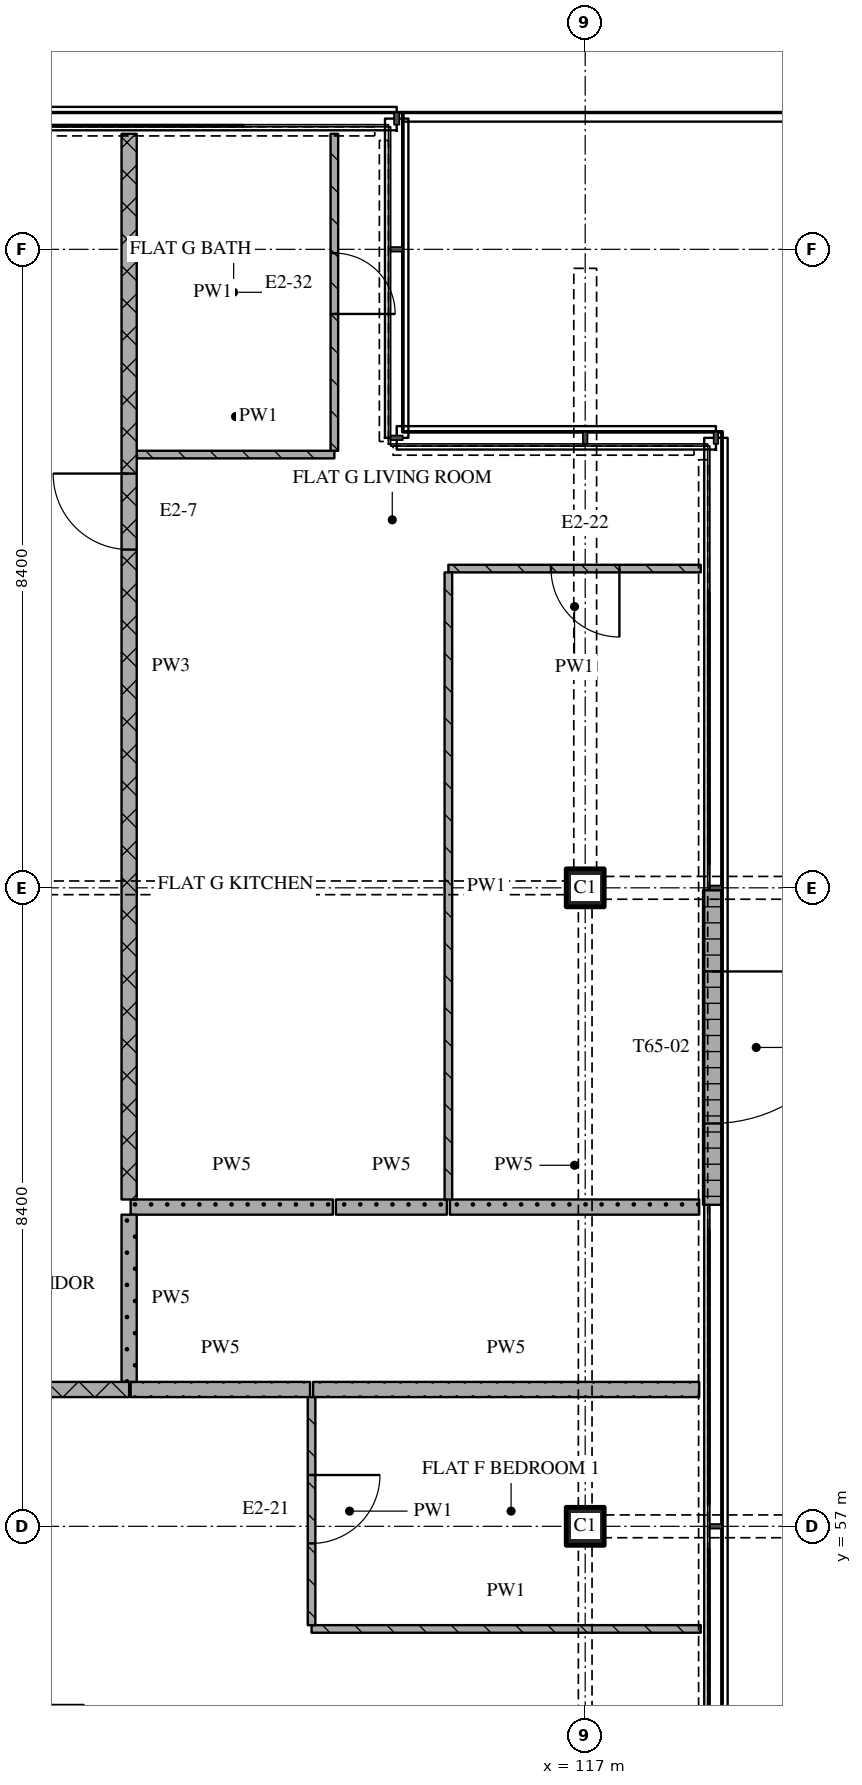
"""IFC4 building model, lengths in metres.
Left out: names, types, materials, properties, quantities, classifications, styles, units other than length and angle.
Written with IfcOpenShell. Run it as: python <this file> out.ifc"""

import sys

from ifc_helpers import new_model, si_unit, direction, frame, frame_2d, origin, origin_2d, place, context, subcontext, project, spatial, rectangle, extrude, element, fill, save


model = new_model("IFC4")
c1 = context("Model", 3, precision=1e-05, world=origin(), true_north=direction((0.0, 1.0)))
c2 = subcontext(c1, "Body", "Model", "MODEL_VIEW")
j1 = project(units=[si_unit("LENGTHUNIT", "METRE"), si_unit("PLANEANGLEUNIT", "RADIAN")], contexts=[c1])
p1 = place(None, origin())
s1 = spatial("IfcSite", under=j1, at=p1, CompositionType="ELEMENT")
p2 = place(p1, origin())
s2 = spatial("IfcBuilding", under=s1, at=p2, CompositionType="ELEMENT")
p3 = place(p2, frame((0.0, 0.0, 270.75)))
s3 = spatial("IfcBuildingStorey", under=s2, at=p3, CompositionType="ELEMENT", Elevation=270.75)
for number, where, z_axis, x_axis in (
    (1, (117.0, 57.0, 0.0), (0.0, 0.0, 1.0), (1.0, 0.0, 0.0)),
    (2, (117.0, 65.4, 0.0), (0.0, 0.0, 1.0), (1.0, 0.0, 0.0)),
):
    element("IfcColumn", number, at=place(p3, frame(where, z_axis=z_axis, x_axis=x_axis)), inside=s3, PredefinedType="COLUMN", context=c2, shape_type="SweptSolid", body=[
        extrude(rectangle(XDim=0.5, YDim=0.5, at=origin_2d()), origin(), (0.0, 0.0, 1.0), 3.6),
    ])
p4 = place(p3, frame((118.675, 65.37, 0.0), z_axis=(0.0, 0.0, 1.0), x_axis=(0.0, -1.0, 0.0)))
e3 = element("IfcWall", 3, at=p4, inside=s3, PredefinedType="SOLIDWALL", context=c2, shape_type="SweptSolid", body=[
    extrude(rectangle(XDim=4.14, YDim=0.25, at=frame_2d((2.07, 0.0))), origin(), (0.0, 0.0, 1.0), 3.32),
])
p5 = place(p4, frame((1.07, 0.0, 0.0)))
e4 = element("IfcOpeningElement", 4, at=p5, cuts=e3, PredefinedType="OPENING", context=c2, shape_type="SweptSolid", body=[
    extrude(rectangle(XDim=2.0, YDim=2.4, at=frame_2d((1.0, 1.2))), frame((0.0, 0.135, 0.0), z_axis=(0.0, -1.0, 0.0), x_axis=(1.0, 0.0, 0.0)), (0.0, 0.0, 1.0), 0.27),
])
p6 = place(p3, frame((101.5, 54.6, 0.0), z_axis=(0.0, 0.0, 1.0), x_axis=(1.0, 0.0, 0.0)))
e5 = element("IfcWall", 5, at=p6, inside=s3, PredefinedType="PARTITIONING", context=c2, shape_type="SweptSolid", body=[
    extrude(rectangle(XDim=8.9, YDim=0.1, at=frame_2d((4.45, 0.0))), origin(), (0.0, 0.0, 1.0), 3.32),
])
p7 = place(p3, frame((113.4, 55.65, 0.0), z_axis=(0.0, 0.0, 1.0), x_axis=(1.0, 0.0, 0.0)))
e6 = element("IfcWall", 6, at=p7, inside=s3, PredefinedType="PARTITIONING", context=c2, shape_type="SweptSolid", body=[
    extrude(rectangle(XDim=5.12, YDim=0.1, at=frame_2d((2.56, 0.0))), origin(), (0.0, 0.0, 1.0), 3.32),
])
p8 = place(p3, frame((101.4, 58.8, 0.0), z_axis=(0.0, 0.0, 1.0), x_axis=(1.0, 0.0, 0.0)))
e7 = element("IfcWall", 7, at=p8, inside=s3, PredefinedType="PARTITIONING", context=c2, shape_type="SweptSolid", body=[
    extrude(rectangle(XDim=9.6, YDim=0.2, at=frame_2d((4.8, 0.0))), origin(), (0.0, 0.0, 1.0), 3.32),
])
p9 = place(p3, frame((111.02, 58.8, 0.0), z_axis=(0.0, 0.0, 1.0), x_axis=(1.0, 0.0, 0.0)))
e8 = element("IfcWall", 8, at=p9, inside=s3, PredefinedType="PARTITIONING", context=c2, shape_type="SweptSolid", body=[
    extrude(rectangle(XDim=2.36, YDim=0.2, at=frame_2d((1.18, 0.0))), origin(), (0.0, 0.0, 1.0), 3.32),
])
p10 = place(p3, frame((113.42, 58.8, 0.0), z_axis=(0.0, 0.0, 1.0), x_axis=(1.0, 0.0, 0.0)))
e9 = element("IfcWall", 9, at=p10, inside=s3, PredefinedType="PARTITIONING", context=c2, shape_type="SweptSolid", body=[
    extrude(rectangle(XDim=5.08, YDim=0.2, at=frame_2d((2.54, 0.0))), origin(), (0.0, 0.0, 1.0), 3.32),
])
p11 = place(p3, frame((111.02, 61.2, 0.0), z_axis=(0.0, 0.0, 1.0), x_axis=(1.0, 0.0, 0.0)))
e10 = element("IfcWall", 10, at=p11, inside=s3, PredefinedType="PARTITIONING", context=c2, shape_type="SweptSolid", body=[
    extrude(rectangle(XDim=2.66, YDim=0.2, at=frame_2d((1.33, 0.0))), origin(), (0.0, 0.0, 1.0), 3.32),
])
p12 = place(p3, frame((113.72, 61.2, 0.0), z_axis=(0.0, 0.0, 1.0), x_axis=(1.0, 0.0, 0.0)))
e11 = element("IfcWall", 11, at=p12, inside=s3, PredefinedType="PARTITIONING", context=c2, shape_type="SweptSolid", body=[
    extrude(rectangle(XDim=1.46, YDim=0.2, at=frame_2d((0.73, 0.0))), origin(), (0.0, 0.0, 1.0), 3.32),
])
p13 = place(p3, frame((115.22, 61.2, 0.0), z_axis=(0.0, 0.0, 1.0), x_axis=(1.0, 0.0, 0.0)))
e12 = element("IfcWall", 12, at=p13, inside=s3, PredefinedType="PARTITIONING", context=c2, shape_type="SweptSolid", body=[
    extrude(rectangle(XDim=3.28, YDim=0.2, at=frame_2d((1.64, 0.0))), origin(), (0.0, 0.0, 1.0), 3.32),
])
p14 = place(p3, frame((118.52, 69.6, 0.0), z_axis=(0.0, 0.0, 1.0), x_axis=(-1.0, 0.0, 0.0)))
e13 = element("IfcWall", 13, at=p14, inside=s3, PredefinedType="PARTITIONING", context=c2, shape_type="SweptSolid", body=[
    extrude(rectangle(XDim=3.32, YDim=0.1, at=frame_2d((1.66, 0.0))), origin(), (0.0, 0.0, 1.0), 3.32),
])
p15 = place(p14, frame((1.07, 0.0, 0.0)))
e14 = element("IfcOpeningElement", 14, at=p15, cuts=e13, PredefinedType="OPENING", context=c2, shape_type="SweptSolid", body=[
    extrude(rectangle(XDim=0.9, YDim=2.1, at=frame_2d((0.45, 1.05))), frame((0.0, 0.06, 0.0), z_axis=(0.0, -1.0, 0.0), x_axis=(1.0, 0.0, 0.0)), (0.0, 0.0, 1.0), 0.12),
])
p16 = place(p3, frame((111.1, 71.1, 0.0), z_axis=(0.0, 0.0, 1.0), x_axis=(1.0, 0.0, 0.0)))
e15 = element("IfcWall", 15, at=p16, inside=s3, PredefinedType="PARTITIONING", context=c2, shape_type="SweptSolid", body=[
    extrude(rectangle(XDim=2.6, YDim=0.1, at=frame_2d((1.3, 0.0))), origin(), (0.0, 0.0, 1.0), 3.32),
])
p17 = place(p3, frame((111.0, 75.32, 0.0), z_axis=(0.0, 0.0, 1.0), x_axis=(0.0, -1.0, 0.0)))
e16 = element("IfcWall", 16, at=p17, inside=s3, PredefinedType="PARTITIONING", context=c2, shape_type="SweptSolid", body=[
    extrude(rectangle(XDim=14.02, YDim=0.2, at=frame_2d((7.01, 0.0))), origin(), (0.0, 0.0, 1.0), 3.32),
])
p18 = place(p17, frame((4.47, 0.0, 0.0)))
e17 = element("IfcOpeningElement", 17, at=p18, cuts=e16, PredefinedType="OPENING", context=c2, shape_type="SweptSolid", body=[
    extrude(rectangle(XDim=1.0, YDim=2.1, at=frame_2d((0.5, 1.05))), frame((0.0, 0.11, 0.0), z_axis=(0.0, -1.0, 0.0), x_axis=(1.0, 0.0, 0.0)), (0.0, 0.0, 1.0), 0.22),
])
p19 = place(p3, frame((111.0, 61.1, 0.0), z_axis=(0.0, 0.0, 1.0), x_axis=(0.0, -1.0, 0.0)))
e18 = element("IfcWall", 18, at=p19, inside=s3, PredefinedType="PARTITIONING", context=c2, shape_type="SweptSolid", body=[
    extrude(rectangle(XDim=2.2, YDim=0.2, at=frame_2d((1.1, 0.0))), origin(), (0.0, 0.0, 1.0), 3.32),
])
p20 = place(p3, frame((113.4, 58.7, 0.0), z_axis=(0.0, 0.0, 1.0), x_axis=(0.0, -1.0, 0.0)))
e19 = element("IfcWall", 19, at=p20, inside=s3, PredefinedType="PARTITIONING", context=c2, shape_type="SweptSolid", body=[
    extrude(rectangle(XDim=3.0, YDim=0.1, at=frame_2d((1.5, 0.0))), origin(), (0.0, 0.0, 1.0), 3.32),
])
p21 = place(p20, frame((1.025, 0.0, 0.0)))
e20 = element("IfcOpeningElement", 20, at=p21, cuts=e19, PredefinedType="OPENING", context=c2, shape_type="SweptSolid", body=[
    extrude(rectangle(XDim=0.9, YDim=2.1, at=frame_2d((0.45, 1.05))), frame((0.0, 0.06, 0.0), z_axis=(0.0, -1.0, 0.0), x_axis=(1.0, 0.0, 0.0)), (0.0, 0.0, 1.0), 0.12),
])
p22 = place(p3, frame((113.7, 71.15, 0.0), z_axis=(0.0, 0.0, 1.0), x_axis=(0.0, 1.0, 0.0)))
e21 = element("IfcWall", 21, at=p22, inside=s3, PredefinedType="PARTITIONING", context=c2, shape_type="SweptSolid", body=[
    extrude(rectangle(XDim=4.17, YDim=0.1, at=frame_2d((2.085, 0.0))), origin(), (0.0, 0.0, 1.0), 3.32),
])
p23 = place(p22, frame((1.8, 0.0, 0.0)))
e22 = element("IfcOpeningElement", 22, at=p23, cuts=e21, PredefinedType="OPENING", context=c2, shape_type="SweptSolid", body=[
    extrude(rectangle(XDim=0.8, YDim=2.1, at=frame_2d((0.4, 1.05))), frame((0.0, 0.06, 0.0), z_axis=(0.0, -1.0, 0.0), x_axis=(1.0, 0.0, 0.0)), (0.0, 0.0, 1.0), 0.12),
])
p24 = place(p3, frame((115.2, 69.55, 0.0), z_axis=(0.0, 0.0, 1.0), x_axis=(0.0, -1.0, 0.0)))
e23 = element("IfcWall", 23, at=p24, inside=s3, PredefinedType="PARTITIONING", context=c2, shape_type="SweptSolid", body=[
    extrude(rectangle(XDim=8.25, YDim=0.1, at=frame_2d((4.125, 0.0))), origin(), (0.0, 0.0, 1.0), 3.32),
])
p25 = place(p5, origin())
e24 = element("IfcDoor", 24, at=p25, inside=s3, OperationType="DOUBLE_DOOR_SINGLE_SWING", PredefinedType="DOOR", context=c2, shape_type="SweptSolid", body=[
    extrude(rectangle(XDim=2.0, YDim=2.4, at=frame_2d((1.0, 1.2))), frame((0.0, 0.025, 0.0), z_axis=(0.0, -1.0, 0.0), x_axis=(1.0, 0.0, 0.0)), (0.0, 0.0, 1.0), 0.05),
])
fill(e4, e24)
p26 = place(p15, origin())
e25 = element("IfcDoor", 25, at=p26, inside=s3, OperationType="SINGLE_SWING_LEFT", PredefinedType="DOOR", context=c2, shape_type="SweptSolid", body=[
    extrude(rectangle(XDim=0.9, YDim=2.1, at=frame_2d((0.45, 1.05))), frame((0.0, 0.025, 0.0), z_axis=(0.0, -1.0, 0.0), x_axis=(1.0, 0.0, 0.0)), (0.0, 0.0, 1.0), 0.05),
])
fill(e14, e25)
p27 = place(p18, origin())
e26 = element("IfcDoor", 26, at=p27, inside=s3, OperationType="SINGLE_SWING_RIGHT", PredefinedType="DOOR", context=c2, shape_type="SweptSolid", body=[
    extrude(rectangle(XDim=1.0, YDim=2.1, at=frame_2d((0.5, 1.05))), frame((0.0, 0.025, 0.0), z_axis=(0.0, -1.0, 0.0), x_axis=(1.0, 0.0, 0.0)), (0.0, 0.0, 1.0), 0.05),
])
fill(e17, e26)
p28 = place(p21, origin())
e27 = element("IfcDoor", 27, at=p28, inside=s3, OperationType="SINGLE_SWING_LEFT", PredefinedType="DOOR", context=c2, shape_type="SweptSolid", body=[
    extrude(rectangle(XDim=0.9, YDim=2.1, at=frame_2d((0.45, 1.05))), frame((0.0, 0.025, 0.0), z_axis=(0.0, -1.0, 0.0), x_axis=(1.0, 0.0, 0.0)), (0.0, 0.0, 1.0), 0.05),
])
fill(e20, e27)
p29 = place(p23, origin())
e28 = element("IfcDoor", 28, at=p29, inside=s3, OperationType="SINGLE_SWING_RIGHT", PredefinedType="DOOR", context=c2, shape_type="SweptSolid", body=[
    extrude(rectangle(XDim=0.8, YDim=2.1, at=frame_2d((0.4, 1.05))), frame((0.0, 0.025, 0.0), z_axis=(0.0, -1.0, 0.0), x_axis=(1.0, 0.0, 0.0)), (0.0, 0.0, 1.0), 0.05),
])
fill(e22, e28)
save(model, sys.argv[1])
